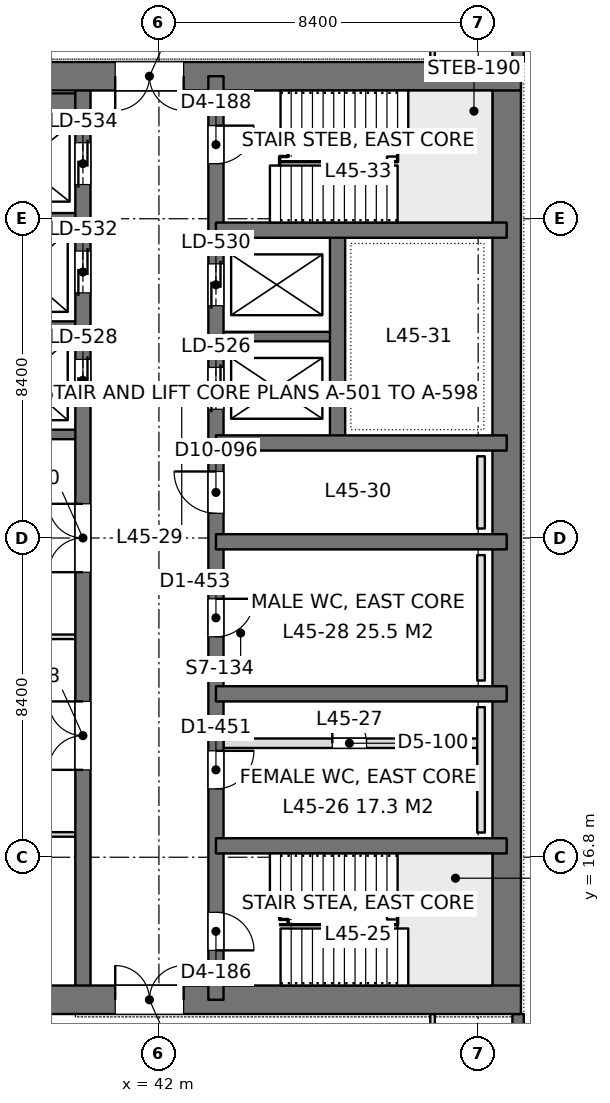
"""IFC4 building model, lengths in metres.
Left out: names, types, materials, properties, quantities, classifications, styles, units other than length and angle.
Written with IfcOpenShell. Run it as: python <this file> out.ifc"""

import sys

from ifc_helpers import new_model, si_unit, direction, frame, frame_2d, origin, place, context, subcontext, project, spatial, rectangle, extrude, element, fill, save


model = new_model("IFC4")
c1 = context("Model", 3, precision=1e-05, world=origin(), true_north=direction((0.0, 1.0)))
c2 = subcontext(c1, "Body", "Model", "MODEL_VIEW")
j1 = project(units=[si_unit("LENGTHUNIT", "METRE"), si_unit("PLANEANGLEUNIT", "RADIAN")], contexts=[c1])
p1 = place(None, origin())
s1 = spatial("IfcSite", under=j1, at=p1, CompositionType="ELEMENT")
p2 = place(p1, origin())
s2 = spatial("IfcBuilding", under=s1, at=p2, CompositionType="ELEMENT")
p3 = place(p2, frame((0.0, 0.0, 198.6)))
s3 = spatial("IfcBuildingStorey", under=s2, at=p3, CompositionType="ELEMENT", Elevation=198.6)
p4 = place(p3, frame((33.675, 13.05, 0.0), z_axis=(0.0, 0.0, 1.0), x_axis=(1.0, 0.0, 0.0)))
e1 = element("IfcWall", 1, at=p4, inside=s3, PredefinedType="SHEAR", context=c2, shape_type="SweptSolid", body=[
    extrude(rectangle(XDim=17.85, YDim=0.75, at=frame_2d((8.925, 0.0))), origin(), (0.0, 0.0, 1.0), 4.2),
])
p5 = place(p4, frame((7.175, 0.0, 0.0)))
e2 = element("IfcOpeningElement", 2, at=p5, cuts=e1, PredefinedType="OPENING", context=c2, shape_type="SweptSolid", body=[
    extrude(rectangle(XDim=1.8, YDim=2.4, at=frame_2d((0.9, 1.2))), frame((0.0, 0.385, 0.0), z_axis=(0.0, -1.0, 0.0), x_axis=(1.0, 0.0, 0.0)), (0.0, 0.0, 1.0), 0.77),
])
p6 = place(p3, frame((33.675, 37.35, 0.0), z_axis=(0.0, 0.0, 1.0), x_axis=(1.0, 0.0, 0.0)))
e3 = element("IfcWall", 3, at=p6, inside=s3, PredefinedType="SHEAR", context=c2, shape_type="SweptSolid", body=[
    extrude(rectangle(XDim=17.85, YDim=0.75, at=frame_2d((8.925, 0.0))), origin(), (0.0, 0.0, 1.0), 4.2),
])
p7 = place(p6, frame((7.175, 0.0, 0.0)))
e4 = element("IfcOpeningElement", 4, at=p7, cuts=e3, PredefinedType="OPENING", context=c2, shape_type="SweptSolid", body=[
    extrude(rectangle(XDim=1.8, YDim=2.4, at=frame_2d((0.9, 1.2))), frame((0.0, 0.385, 0.0), z_axis=(0.0, -1.0, 0.0), x_axis=(1.0, 0.0, 0.0)), (0.0, 0.0, 1.0), 0.77),
])
p8 = place(p3, frame((51.15, 13.05, 0.0), z_axis=(0.0, 0.0, 1.0), x_axis=(0.0, 1.0, 0.0)))
e5 = element("IfcWall", 5, at=p8, inside=s3, PredefinedType="SHEAR", context=c2, shape_type="SweptSolid", body=[
    extrude(rectangle(XDim=24.3, YDim=0.75, at=frame_2d((12.15, 0.0))), origin(), (0.0, 0.0, 1.0), 4.2),
])
p9 = place(p3, frame((43.5, 13.05, 0.0), z_axis=(0.0, 0.0, 1.0), x_axis=(0.0, 1.0, 0.0)))
e6 = element("IfcWall", 6, at=p9, inside=s3, PredefinedType="SHEAR", context=c2, shape_type="SweptSolid", body=[
    extrude(rectangle(XDim=24.3, YDim=0.4, at=frame_2d((12.15, 0.0))), origin(), (0.0, 0.0, 1.0), 4.2),
])
p10 = place(p9, frame((1.3, 0.0, 0.0)))
e7 = element("IfcOpeningElement", 7, at=p10, cuts=e6, PredefinedType="OPENING", context=c2, shape_type="SweptSolid", body=[
    extrude(rectangle(XDim=1.0, YDim=2.2, at=frame_2d((0.5, 1.1))), frame((0.0, 0.21, 0.0), z_axis=(0.0, -1.0, 0.0), x_axis=(1.0, 0.0, 0.0)), (0.0, 0.0, 1.0), 0.42),
])
p11 = place(p9, frame((22.0, 0.0, 0.0)))
e8 = element("IfcOpeningElement", 8, at=p11, cuts=e6, PredefinedType="OPENING", context=c2, shape_type="SweptSolid", body=[
    extrude(rectangle(XDim=1.0, YDim=2.2, at=frame_2d((0.5, 1.1))), frame((0.0, 0.21, 0.0), z_axis=(0.0, -1.0, 0.0), x_axis=(1.0, 0.0, 0.0)), (0.0, 0.0, 1.0), 0.42),
])
p12 = place(p9, frame((5.55, 0.0, 0.0)))
e9 = element("IfcOpeningElement", 9, at=p12, cuts=e6, PredefinedType="OPENING", context=c2, shape_type="SweptSolid", body=[
    extrude(rectangle(XDim=1.0, YDim=2.2, at=frame_2d((0.5, 1.1))), frame((0.0, 0.21, 0.0), z_axis=(0.0, -1.0, 0.0), x_axis=(1.0, 0.0, 0.0)), (0.0, 0.0, 1.0), 0.42),
])
p13 = place(p9, frame((9.55, 0.0, 0.0)))
e10 = element("IfcOpeningElement", 10, at=p13, cuts=e6, PredefinedType="OPENING", context=c2, shape_type="SweptSolid", body=[
    extrude(rectangle(XDim=1.0, YDim=2.2, at=frame_2d((0.5, 1.1))), frame((0.0, 0.21, 0.0), z_axis=(0.0, -1.0, 0.0), x_axis=(1.0, 0.0, 0.0)), (0.0, 0.0, 1.0), 0.42),
])
p14 = place(p9, frame((12.8, 0.0, 0.0)))
e11 = element("IfcOpeningElement", 11, at=p14, cuts=e6, PredefinedType="OPENING", context=c2, shape_type="SweptSolid", body=[
    extrude(rectangle(XDim=1.1, YDim=2.2, at=frame_2d((0.55, 1.1))), frame((0.0, 0.21, 0.0), z_axis=(0.0, -1.0, 0.0), x_axis=(1.0, 0.0, 0.0)), (0.0, 0.0, 1.0), 0.42),
])
p15 = place(p9, frame((15.538, 0.0, 0.0)))
e12 = element("IfcOpeningElement", 12, at=p15, cuts=e6, PredefinedType="OPENING", context=c2, shape_type="SweptSolid", body=[
    extrude(rectangle(XDim=1.1, YDim=2.2, at=frame_2d((0.55, 1.1))), frame((0.0, 0.21, 0.0), z_axis=(0.0, -1.0, 0.0), x_axis=(1.0, 0.0, 0.0)), (0.0, 0.0, 1.0), 0.42),
])
p16 = place(p9, frame((18.262, 0.0, 0.0)))
e13 = element("IfcOpeningElement", 13, at=p16, cuts=e6, PredefinedType="OPENING", context=c2, shape_type="SweptSolid", body=[
    extrude(rectangle(XDim=1.1, YDim=2.2, at=frame_2d((0.55, 1.1))), frame((0.0, 0.21, 0.0), z_axis=(0.0, -1.0, 0.0), x_axis=(1.0, 0.0, 0.0)), (0.0, 0.0, 1.0), 0.42),
])
p17 = place(p3, frame((40.0, 13.05, 0.0), z_axis=(0.0, 0.0, 1.0), x_axis=(0.0, 1.0, 0.0)))
e14 = element("IfcWall", 14, at=p17, inside=s3, PredefinedType="SHEAR", context=c2, shape_type="SweptSolid", body=[
    extrude(rectangle(XDim=24.3, YDim=0.4, at=frame_2d((12.15, 0.0))), origin(), (0.0, 0.0, 1.0), 4.2),
])
p18 = place(p17, frame((15.75, 0.0, 0.0)))
e15 = element("IfcOpeningElement", 15, at=p18, cuts=e14, PredefinedType="OPENING", context=c2, shape_type="SweptSolid", body=[
    extrude(rectangle(XDim=1.1, YDim=2.2, at=frame_2d((0.55, 1.1))), frame((0.0, 0.21, 0.0), z_axis=(0.0, -1.0, 0.0), x_axis=(1.0, 0.0, 0.0)), (0.0, 0.0, 1.0), 0.42),
])
p19 = place(p17, frame((18.6, 0.0, 0.0)))
e16 = element("IfcOpeningElement", 16, at=p19, cuts=e14, PredefinedType="OPENING", context=c2, shape_type="SweptSolid", body=[
    extrude(rectangle(XDim=1.1, YDim=2.2, at=frame_2d((0.55, 1.1))), frame((0.0, 0.21, 0.0), z_axis=(0.0, -1.0, 0.0), x_axis=(1.0, 0.0, 0.0)), (0.0, 0.0, 1.0), 0.42),
])
p20 = place(p17, frame((21.45, 0.0, 0.0)))
e17 = element("IfcOpeningElement", 17, at=p20, cuts=e14, PredefinedType="OPENING", context=c2, shape_type="SweptSolid", body=[
    extrude(rectangle(XDim=1.1, YDim=2.2, at=frame_2d((0.55, 1.1))), frame((0.0, 0.21, 0.0), z_axis=(0.0, -1.0, 0.0), x_axis=(1.0, 0.0, 0.0)), (0.0, 0.0, 1.0), 0.42),
])
p21 = place(p17, frame((6.05, 0.0, 0.0)))
e18 = element("IfcOpeningElement", 18, at=p21, cuts=e14, PredefinedType="OPENING", context=c2, shape_type="SweptSolid", body=[
    extrude(rectangle(XDim=1.8, YDim=2.4, at=frame_2d((0.9, 1.2))), frame((0.0, 0.21, 0.0), z_axis=(0.0, -1.0, 0.0), x_axis=(1.0, 0.0, 0.0)), (0.0, 0.0, 1.0), 0.42),
])
p22 = place(p17, frame((11.25, 0.0, 0.0)))
e19 = element("IfcOpeningElement", 19, at=p22, cuts=e14, PredefinedType="OPENING", context=c2, shape_type="SweptSolid", body=[
    extrude(rectangle(XDim=1.8, YDim=2.4, at=frame_2d((0.9, 1.2))), frame((0.0, 0.21, 0.0), z_axis=(0.0, -1.0, 0.0), x_axis=(1.0, 0.0, 0.0)), (0.0, 0.0, 1.0), 0.42),
])
for number, where, z_axis, x_axis in (
    (20, (51.15, 17.1, 0.0), (0.0, 0.0, 1.0), (-1.0, 0.0, 0.0)),
    (21, (51.15, 21.1, 0.0), (0.0, 0.0, 1.0), (-1.0, 0.0, 0.0)),
    (22, (51.15, 25.1, 0.0), (0.0, 0.0, 1.0), (-1.0, 0.0, 0.0)),
    (23, (51.15, 27.7, 0.0), (0.0, 0.0, 1.0), (-1.0, 0.0, 0.0)),
    (24, (51.15, 33.3, 0.0), (0.0, 0.0, 1.0), (-1.0, 0.0, 0.0)),
):
    element("IfcWall", number, at=place(p3, frame(where, z_axis=z_axis, x_axis=x_axis)), inside=s3, PredefinedType="SHEAR", context=c2, shape_type="SweptSolid", body=[
        extrude(rectangle(XDim=7.65, YDim=0.4, at=frame_2d((3.825, 0.0))), origin(), (0.0, 0.0, 1.0), 4.2),
    ])
p23 = place(p3, frame((46.7, 27.7, 0.0), z_axis=(0.0, 0.0, 1.0), x_axis=(0.0, 1.0, 0.0)))
e25 = element("IfcWall", 25, at=p23, inside=s3, PredefinedType="SHEAR", context=c2, shape_type="SweptSolid", body=[
    extrude(rectangle(XDim=5.6, YDim=0.4, at=frame_2d((2.8, 0.0))), origin(), (0.0, 0.0, 1.0), 4.2),
])
p24 = place(p3, frame((46.7, 30.5, 0.0), z_axis=(0.0, 0.0, 1.0), x_axis=(-1.0, 0.0, 0.0)))
e26 = element("IfcWall", 26, at=p24, inside=s3, PredefinedType="SHEAR", context=c2, shape_type="SweptSolid", body=[
    extrude(rectangle(XDim=3.2, YDim=0.25, at=frame_2d((1.6, 0.0))), origin(), (0.0, 0.0, 1.0), 4.2),
])
p25 = place(p3, frame((40.0, 27.925, 0.0), z_axis=(0.0, 0.0, 1.0), x_axis=(-1.0, 0.0, 0.0)))
e27 = element("IfcWall", 27, at=p25, inside=s3, PredefinedType="SHEAR", context=c2, shape_type="SweptSolid", body=[
    extrude(rectangle(XDim=5.95, YDim=0.25, at=frame_2d((2.975, 0.0))), origin(), (0.0, 0.0, 1.0), 4.2),
])
for number, where, z_axis, x_axis in (
    (28, (40.0, 30.775, 0.0), (0.0, 0.0, 1.0), (-1.0, 0.0, 0.0)),
    (29, (40.0, 33.625, 0.0), (0.0, 0.0, 1.0), (-1.0, 0.0, 0.0)),
):
    element("IfcWall", number, at=place(p3, frame(where, z_axis=z_axis, x_axis=x_axis)), inside=s3, PredefinedType="SHEAR", context=c2, shape_type="SweptSolid", body=[
        extrude(rectangle(XDim=3.2, YDim=0.25, at=frame_2d((1.6, 0.0))), origin(), (0.0, 0.0, 1.0), 4.2),
    ])
p26 = place(p3, frame((40.0, 36.625, 0.0), z_axis=(0.0, 0.0, 1.0), x_axis=(-1.0, 0.0, 0.0)))
e30 = element("IfcWall", 30, at=p26, inside=s3, PredefinedType="SHEAR", context=c2, shape_type="SweptSolid", body=[
    extrude(rectangle(XDim=3.2, YDim=0.55, at=frame_2d((1.6, 0.0))), origin(), (0.0, 0.0, 1.0), 4.2),
])
p27 = place(p3, frame((51.45, 42.0, 0.0), z_axis=(0.0, 0.0, 1.0), x_axis=(0.0, -1.0, 0.0)))
e31 = element("IfcWall", 31, at=p27, inside=s3, PredefinedType="SOLIDWALL", context=c2, shape_type="SweptSolid", body=[
    extrude(rectangle(XDim=4.275, YDim=0.3, at=frame_2d((2.137, 0.0))), origin(), (0.0, 0.0, 1.0), 4.05),
])
p28 = place(p27, frame((0.938, 0.0, 0.9)))
e32 = element("IfcOpeningElement", 32, at=p28, cuts=e31, PredefinedType="OPENING", context=c2, shape_type="SweptSolid", body=[
    extrude(rectangle(XDim=2.4, YDim=1.9, at=frame_2d((1.2, 0.95))), frame((0.0, 0.16, 0.0), z_axis=(0.0, -1.0, 0.0), x_axis=(1.0, 0.0, 0.0)), (0.0, 0.0, 1.0), 0.32),
])
p29 = place(p3, frame((51.45, 12.675, 0.0), z_axis=(0.0, 0.0, 1.0), x_axis=(0.0, -1.0, 0.0)))
e33 = element("IfcWall", 33, at=p29, inside=s3, PredefinedType="SOLIDWALL", context=c2, shape_type="SweptSolid", body=[
    extrude(rectangle(XDim=4.275, YDim=0.3, at=frame_2d((2.138, 0.0))), origin(), (0.0, 0.0, 1.0), 4.05),
])
p30 = place(p29, frame((0.938, 0.0, 0.9)))
e34 = element("IfcOpeningElement", 34, at=p30, cuts=e33, PredefinedType="OPENING", context=c2, shape_type="SweptSolid", body=[
    extrude(rectangle(XDim=2.4, YDim=1.9, at=frame_2d((1.2, 0.95))), frame((0.0, 0.16, 0.0), z_axis=(0.0, -1.0, 0.0), x_axis=(1.0, 0.0, 0.0)), (0.0, 0.0, 1.0), 0.32),
])
p31 = place(p3, frame((33.898, 17.4, 0.0), z_axis=(0.0, 0.0, 1.0), x_axis=(1.0, 0.0, 0.0)))
e35 = element("IfcWall", 35, at=p31, inside=s3, PredefinedType="PARTITIONING", context=c2, shape_type="SweptSolid", body=[
    extrude(rectangle(XDim=5.904, YDim=0.12, at=frame_2d((2.952, 0.0))), origin(), (0.0, 0.0, 1.0), 3.55),
])
p32 = place(p3, frame((34.749, 22.6, 0.0), z_axis=(0.0, 0.0, 1.0), x_axis=(1.0, 0.0, 0.0)))
e36 = element("IfcWall", 36, at=p32, inside=s3, PredefinedType="PARTITIONING", context=c2, shape_type="SweptSolid", body=[
    extrude(rectangle(XDim=5.053, YDim=0.12, at=frame_2d((2.526, 0.0))), origin(), (0.0, 0.0, 1.0), 4.05),
])
p33 = place(p3, frame((49.2, 10.7, 0.0), z_axis=(0.0, 0.0, 1.0), x_axis=(0.0, 1.0, 0.0)))
e37 = element("IfcWall", 37, at=p33, inside=s3, PredefinedType="PARTITIONING", context=c2, shape_type="SweptSolid", body=[
    extrude(rectangle(XDim=1.976, YDim=0.12, at=frame_2d((0.988, 0.0))), origin(), (0.0, 0.0, 1.0), 4.05),
])
p34 = place(p3, frame((49.2, 37.724, 0.0), z_axis=(0.0, 0.0, 1.0), x_axis=(0.0, 1.0, 0.0)))
e38 = element("IfcWall", 38, at=p34, inside=s3, PredefinedType="PARTITIONING", context=c2, shape_type="SweptSolid", body=[
    extrude(rectangle(XDim=1.976, YDim=0.12, at=frame_2d((0.988, 0.0))), origin(), (0.0, 0.0, 1.0), 4.05),
])
p35 = place(p3, frame((43.7, 19.8, 0.0), z_axis=(0.0, 0.0, 1.0), x_axis=(1.0, 0.0, 0.0)))
e39 = element("IfcWall", 39, at=p35, inside=s3, PredefinedType="PARTITIONING", context=c2, shape_type="SweptSolid", body=[
    extrude(rectangle(XDim=6.675, YDim=0.25, at=frame_2d((3.337, 0.0))), origin(), (0.0, 0.0, 1.0), 4.0),
])
p36 = place(p35, frame((2.863, 0.0, 0.0)))
e40 = element("IfcOpeningElement", 40, at=p36, cuts=e39, PredefinedType="OPENING", context=c2, shape_type="SweptSolid", body=[
    extrude(rectangle(XDim=0.9, YDim=2.2, at=frame_2d((0.45, 1.1))), frame((0.0, 0.135, 0.0), z_axis=(0.0, -1.0, 0.0), x_axis=(1.0, 0.0, 0.0)), (0.0, 0.0, 1.0), 0.27),
])
for number, where, z_axis, x_axis in (
    (41, (50.475, 17.45, 0.0), (0.0, 0.0, 1.0), (0.0, 1.0, 0.0)),
    (42, (50.475, 21.45, 0.0), (0.0, 0.0, 1.0), (0.0, 1.0, 0.0)),
):
    element("IfcWall", number, at=place(p3, frame(where, z_axis=z_axis, x_axis=x_axis)), inside=s3, PredefinedType="PLUMBINGWALL", context=c2, shape_type="SweptSolid", body=[
        extrude(rectangle(XDim=3.3, YDim=0.2, at=frame_2d((1.65, 0.0))), origin(), (0.0, 0.0, 1.0), 1.2),
    ])
p37 = place(p3, frame((50.475, 25.45, 0.0), z_axis=(0.0, 0.0, 1.0), x_axis=(0.0, 1.0, 0.0)))
e43 = element("IfcWall", 43, at=p37, inside=s3, PredefinedType="PLUMBINGWALL", context=c2, shape_type="SweptSolid", body=[
    extrude(rectangle(XDim=1.9, YDim=0.2, at=frame_2d((0.95, 0.0))), origin(), (0.0, 0.0, 1.0), 1.2),
])
p38 = place(p5, origin())
e44 = element("IfcDoor", 44, at=p38, inside=s3, OperationType="DOUBLE_DOOR_SINGLE_SWING", PredefinedType="DOOR", context=c2, shape_type="SweptSolid", body=[
    extrude(rectangle(XDim=1.8, YDim=2.4, at=frame_2d((0.9, 1.2))), frame((0.0, 0.025, 0.0), z_axis=(0.0, -1.0, 0.0), x_axis=(1.0, 0.0, 0.0)), (0.0, 0.0, 1.0), 0.05),
])
fill(e2, e44)
p39 = place(p7, frame((1.8, 0.0, 0.0), z_axis=(0.0, 0.0, 1.0), x_axis=(-1.0, 0.0, 0.0)))
e45 = element("IfcDoor", 45, at=p39, inside=s3, OperationType="DOUBLE_DOOR_SINGLE_SWING", PredefinedType="DOOR", context=c2, shape_type="SweptSolid", body=[
    extrude(rectangle(XDim=1.8, YDim=2.4, at=frame_2d((0.9, 1.2))), frame((0.0, 0.025, 0.0), z_axis=(0.0, -1.0, 0.0), x_axis=(1.0, 0.0, 0.0)), (0.0, 0.0, 1.0), 0.05),
])
fill(e4, e45)
p40 = place(p10, frame((1.0, 0.0, 0.0), z_axis=(0.0, 0.0, 1.0), x_axis=(-1.0, 0.0, 0.0)))
e46 = element("IfcDoor", 46, at=p40, inside=s3, OperationType="SINGLE_SWING_RIGHT", PredefinedType="DOOR", context=c2, shape_type="SweptSolid", body=[
    extrude(rectangle(XDim=1.0, YDim=2.2, at=frame_2d((0.5, 1.1))), frame((0.0, 0.025, 0.0), z_axis=(0.0, -1.0, 0.0), x_axis=(1.0, 0.0, 0.0)), (0.0, 0.0, 1.0), 0.05),
])
fill(e7, e46)
p41 = place(p11, frame((1.0, 0.0, 0.0), z_axis=(0.0, 0.0, 1.0), x_axis=(-1.0, 0.0, 0.0)))
e47 = element("IfcDoor", 47, at=p41, inside=s3, OperationType="SINGLE_SWING_LEFT", PredefinedType="DOOR", context=c2, shape_type="SweptSolid", body=[
    extrude(rectangle(XDim=1.0, YDim=2.2, at=frame_2d((0.5, 1.1))), frame((0.0, 0.025, 0.0), z_axis=(0.0, -1.0, 0.0), x_axis=(1.0, 0.0, 0.0)), (0.0, 0.0, 1.0), 0.05),
])
fill(e8, e47)
p42 = place(p12, frame((1.0, 0.0, 0.0), z_axis=(0.0, 0.0, 1.0), x_axis=(-1.0, 0.0, 0.0)))
e48 = element("IfcDoor", 48, at=p42, inside=s3, OperationType="SINGLE_SWING_LEFT", PredefinedType="DOOR", context=c2, shape_type="SweptSolid", body=[
    extrude(rectangle(XDim=1.0, YDim=2.2, at=frame_2d((0.5, 1.1))), frame((0.0, 0.025, 0.0), z_axis=(0.0, -1.0, 0.0), x_axis=(1.0, 0.0, 0.0)), (0.0, 0.0, 1.0), 0.05),
])
fill(e9, e48)
p43 = place(p13, frame((1.0, 0.0, 0.0), z_axis=(0.0, 0.0, 1.0), x_axis=(-1.0, 0.0, 0.0)))
e49 = element("IfcDoor", 49, at=p43, inside=s3, OperationType="SINGLE_SWING_LEFT", PredefinedType="DOOR", context=c2, shape_type="SweptSolid", body=[
    extrude(rectangle(XDim=1.0, YDim=2.2, at=frame_2d((0.5, 1.1))), frame((0.0, 0.025, 0.0), z_axis=(0.0, -1.0, 0.0), x_axis=(1.0, 0.0, 0.0)), (0.0, 0.0, 1.0), 0.05),
])
fill(e10, e49)
p44 = place(p14, origin())
e50 = element("IfcDoor", 50, at=p44, inside=s3, OperationType="SINGLE_SWING_RIGHT", PredefinedType="DOOR", context=c2, shape_type="SweptSolid", body=[
    extrude(rectangle(XDim=1.1, YDim=2.2, at=frame_2d((0.55, 1.1))), frame((0.0, 0.025, 0.0), z_axis=(0.0, -1.0, 0.0), x_axis=(1.0, 0.0, 0.0)), (0.0, 0.0, 1.0), 0.05),
])
fill(e11, e50)
p45 = place(p18, origin())
e51 = element("IfcDoor", 51, at=p45, inside=s3, OperationType="DOUBLE_DOOR_SLIDING", PredefinedType="DOOR", context=c2, shape_type="SweptSolid", body=[
    extrude(rectangle(XDim=1.1, YDim=2.2, at=frame_2d((0.55, 1.1))), frame((0.0, 0.025, 0.0), z_axis=(0.0, -1.0, 0.0), x_axis=(1.0, 0.0, 0.0)), (0.0, 0.0, 1.0), 0.05),
])
fill(e15, e51)
p46 = place(p19, origin())
e52 = element("IfcDoor", 52, at=p46, inside=s3, OperationType="DOUBLE_DOOR_SLIDING", PredefinedType="DOOR", context=c2, shape_type="SweptSolid", body=[
    extrude(rectangle(XDim=1.1, YDim=2.2, at=frame_2d((0.55, 1.1))), frame((0.0, 0.025, 0.0), z_axis=(0.0, -1.0, 0.0), x_axis=(1.0, 0.0, 0.0)), (0.0, 0.0, 1.0), 0.05),
])
fill(e16, e52)
p47 = place(p20, origin())
e53 = element("IfcDoor", 53, at=p47, inside=s3, OperationType="DOUBLE_DOOR_SLIDING", PredefinedType="DOOR", context=c2, shape_type="SweptSolid", body=[
    extrude(rectangle(XDim=1.1, YDim=2.2, at=frame_2d((0.55, 1.1))), frame((0.0, 0.025, 0.0), z_axis=(0.0, -1.0, 0.0), x_axis=(1.0, 0.0, 0.0)), (0.0, 0.0, 1.0), 0.05),
])
fill(e17, e53)
p48 = place(p15, origin())
e54 = element("IfcDoor", 54, at=p48, inside=s3, OperationType="DOUBLE_DOOR_SLIDING", PredefinedType="DOOR", context=c2, shape_type="SweptSolid", body=[
    extrude(rectangle(XDim=1.1, YDim=2.2, at=frame_2d((0.55, 1.1))), frame((0.0, 0.025, 0.0), z_axis=(0.0, -1.0, 0.0), x_axis=(1.0, 0.0, 0.0)), (0.0, 0.0, 1.0), 0.05),
])
fill(e12, e54)
p49 = place(p16, origin())
e55 = element("IfcDoor", 55, at=p49, inside=s3, OperationType="DOUBLE_DOOR_SLIDING", PredefinedType="DOOR", context=c2, shape_type="SweptSolid", body=[
    extrude(rectangle(XDim=1.1, YDim=2.2, at=frame_2d((0.55, 1.1))), frame((0.0, 0.025, 0.0), z_axis=(0.0, -1.0, 0.0), x_axis=(1.0, 0.0, 0.0)), (0.0, 0.0, 1.0), 0.05),
])
fill(e13, e55)
p50 = place(p21, origin())
e56 = element("IfcDoor", 56, at=p50, inside=s3, OperationType="DOUBLE_DOOR_SINGLE_SWING", PredefinedType="DOOR", context=c2, shape_type="SweptSolid", body=[
    extrude(rectangle(XDim=1.8, YDim=2.4, at=frame_2d((0.9, 1.2))), frame((0.0, 0.025, 0.0), z_axis=(0.0, -1.0, 0.0), x_axis=(1.0, 0.0, 0.0)), (0.0, 0.0, 1.0), 0.05),
])
fill(e18, e56)
p51 = place(p22, origin())
e57 = element("IfcDoor", 57, at=p51, inside=s3, OperationType="DOUBLE_DOOR_SINGLE_SWING", PredefinedType="DOOR", context=c2, shape_type="SweptSolid", body=[
    extrude(rectangle(XDim=1.8, YDim=2.4, at=frame_2d((0.9, 1.2))), frame((0.0, 0.025, 0.0), z_axis=(0.0, -1.0, 0.0), x_axis=(1.0, 0.0, 0.0)), (0.0, 0.0, 1.0), 0.05),
])
fill(e19, e57)
p52 = place(p36, origin())
e58 = element("IfcDoor", 58, at=p52, inside=s3, OperationType="SINGLE_SWING_LEFT", PredefinedType="DOOR", context=c2, shape_type="SweptSolid", body=[
    extrude(rectangle(XDim=0.9, YDim=2.2, at=frame_2d((0.45, 1.1))), frame((0.0, 0.025, 0.0), z_axis=(0.0, -1.0, 0.0), x_axis=(1.0, 0.0, 0.0)), (0.0, 0.0, 1.0), 0.05),
])
fill(e40, e58)
save(model, sys.argv[1])
